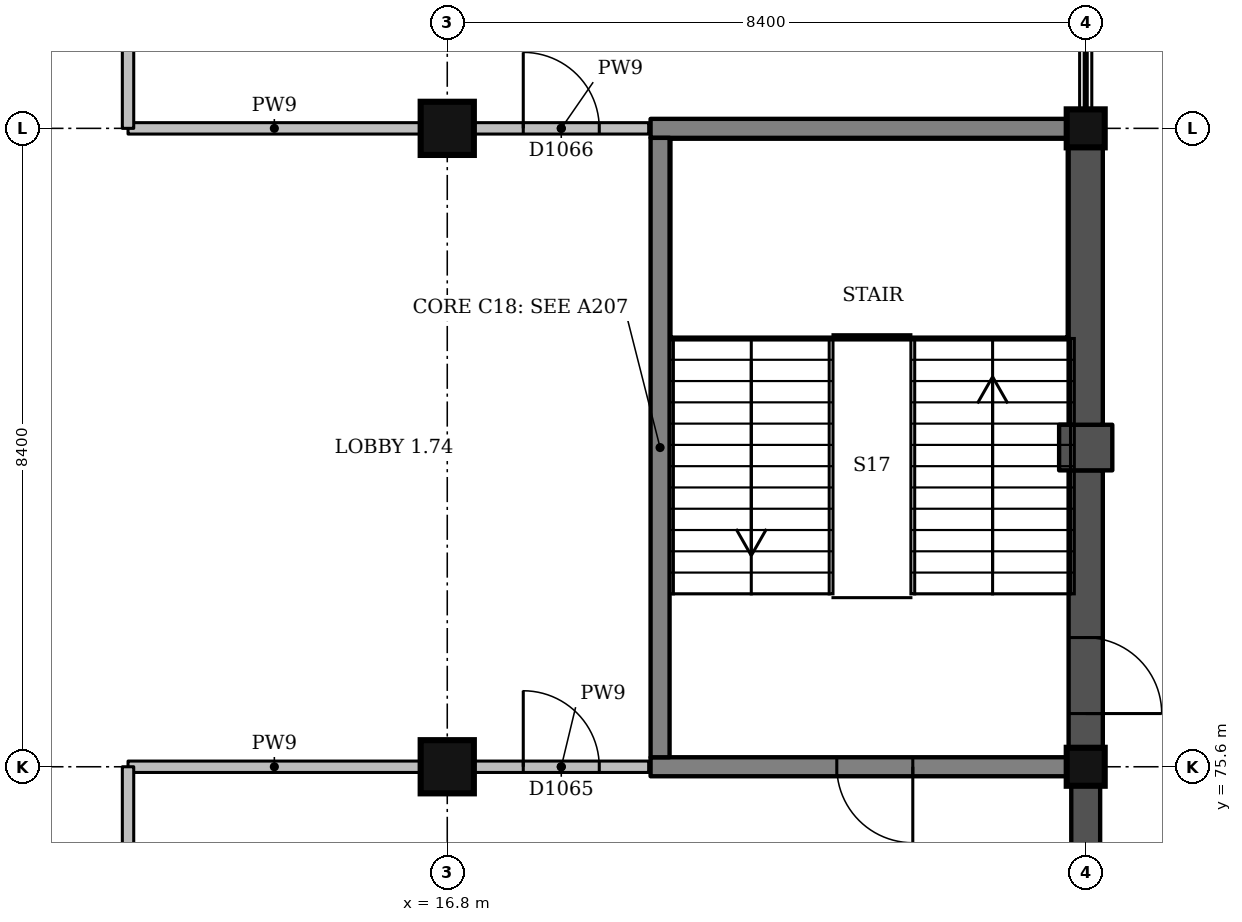
"""IFC4 building model, lengths in metres.
Left out: names, types, materials, properties, quantities, classifications, styles, units other than length and angle.
Written with IfcOpenShell. Run it as: python <this file> out.ifc"""

import sys

from ifc_helpers import new_model, si_unit, direction, frame, frame_2d, origin, origin_2d, place, context, subcontext, project, spatial, rectangle, extrude, element, fill, save


model = new_model("IFC4")
c1 = context("Model", 3, precision=1e-05, world=origin(), true_north=direction((0.0, 1.0)))
c2 = subcontext(c1, "Body", "Model", "MODEL_VIEW")
j1 = project(units=[si_unit("LENGTHUNIT", "METRE"), si_unit("PLANEANGLEUNIT", "RADIAN")], contexts=[c1])
p1 = place(None, origin())
s1 = spatial("IfcSite", under=j1, at=p1, CompositionType="ELEMENT")
p2 = place(p1, origin())
s2 = spatial("IfcBuilding", under=s1, at=p2, CompositionType="ELEMENT")
p3 = place(p2, frame((0.0, 0.0, 4.5)))
s3 = spatial("IfcBuildingStorey", under=s2, at=p3, CompositionType="ELEMENT", Elevation=4.5)
for number, where, z_axis, x_axis in (
    (1, (16.8, 75.6, -1.5), (0.0, 0.0, 1.0), (1.0, 0.0, 0.0)),
    (2, (16.8, 84.0, -1.5), (0.0, 0.0, 1.0), (1.0, 0.0, 0.0)),
):
    element("IfcColumn", number, at=place(p3, frame(where, z_axis=z_axis, x_axis=x_axis)), inside=s3, PredefinedType="COLUMN", context=c2, shape_type="SweptSolid", body=[
        extrude(rectangle(XDim=0.7, YDim=0.7, at=origin_2d()), origin(), (0.0, 0.0, 1.0), 6.0),
    ])
for number, where, z_axis, x_axis in (
    (3, (25.2, 75.6, -1.5), (0.0, 0.0, 1.0), (1.0, 0.0, 0.0)),
    (4, (25.2, 84.0, -1.5), (0.0, 0.0, 1.0), (1.0, 0.0, 0.0)),
):
    element("IfcColumn", number, at=place(p3, frame(where, z_axis=z_axis, x_axis=x_axis)), inside=s3, PredefinedType="COLUMN", context=c2, shape_type="SweptSolid", body=[
        extrude(rectangle(XDim=0.5, YDim=0.5, at=origin_2d()), origin(), (0.0, 0.0, 1.0), 6.0),
    ])
p4 = place(p3, frame((19.475, 75.6, 0.0), z_axis=(0.0, 0.0, 1.0), x_axis=(1.0, 0.0, 0.0)))
e5 = element("IfcWall", 5, at=p4, inside=s3, PredefinedType="SHEAR", context=c2, shape_type="SweptSolid", body=[
    extrude(rectangle(XDim=5.475, YDim=0.25, at=frame_2d((2.737, 0.0))), origin(), (0.0, 0.0, 1.0), 4.5),
])
p5 = place(p4, frame((2.45, 0.0, 0.0)))
e6 = element("IfcOpeningElement", 6, at=p5, cuts=e5, PredefinedType="OPENING", context=c2, shape_type="SweptSolid", body=[
    extrude(rectangle(XDim=1.0, YDim=2.1, at=frame_2d((0.5, 1.05))), frame((0.0, 0.135, 0.0), z_axis=(0.0, -1.0, 0.0), x_axis=(1.0, 0.0, 0.0)), (0.0, 0.0, 1.0), 0.27),
])
p6 = place(p3, frame((19.475, 84.0, 0.0), z_axis=(0.0, 0.0, 1.0), x_axis=(1.0, 0.0, 0.0)))
e7 = element("IfcWall", 7, at=p6, inside=s3, PredefinedType="SHEAR", context=c2, shape_type="SweptSolid", body=[
    extrude(rectangle(XDim=5.475, YDim=0.25, at=frame_2d((2.737, 0.0))), origin(), (0.0, 0.0, 1.0), 4.5),
])
p7 = place(p3, frame((19.6, 75.725, 0.0), z_axis=(0.0, 0.0, 1.0), x_axis=(0.0, 1.0, 0.0)))
e8 = element("IfcWall", 8, at=p7, inside=s3, PredefinedType="SHEAR", context=c2, shape_type="SweptSolid", body=[
    extrude(rectangle(XDim=8.15, YDim=0.25, at=frame_2d((4.075, 0.0))), origin(), (0.0, 0.0, 1.0), 4.5),
])
p8 = place(p3, frame((25.2, 71.7, 0.0), z_axis=(0.0, 0.0, 1.0), x_axis=(0.0, 1.0, 0.0)))
e9 = element("IfcWall", 9, at=p8, inside=s3, PredefinedType="SOLIDWALL", context=c2, shape_type="SweptSolid", body=[
    extrude(rectangle(XDim=3.65, YDim=0.38, at=frame_2d((1.825, 0.0))), origin(), (0.0, 0.0, 1.0), 3.35),
])
p9 = place(p8, frame((1.325, 0.0, 0.0)))
e10 = element("IfcOpeningElement", 10, at=p9, cuts=e9, PredefinedType="OPENING", context=c2, shape_type="SweptSolid", body=[
    extrude(rectangle(XDim=1.0, YDim=2.1, at=frame_2d((0.5, 1.05))), frame((0.0, 0.2, 0.0), z_axis=(0.0, -1.0, 0.0), x_axis=(1.0, 0.0, 0.0)), (0.0, 0.0, 1.0), 0.4),
])
p10 = place(p3, frame((25.2, 75.85, 0.0), z_axis=(0.0, 0.0, 1.0), x_axis=(0.0, 1.0, 0.0)))
e11 = element("IfcWall", 11, at=p10, inside=s3, PredefinedType="SOLIDWALL", context=c2, shape_type="SweptSolid", body=[
    extrude(rectangle(XDim=3.65, YDim=0.45, at=frame_2d((1.825, 0.0))), origin(), (0.0, 0.0, 1.0), 3.65),
])
p11 = place(p10, frame((1.45, 0.0, 0.0), z_axis=(0.0, 0.0, 1.0), x_axis=(-1.0, 0.0, 0.0)))
e12 = element("IfcOpeningElement", 12, at=p11, cuts=e11, PredefinedType="OPENING", context=c2, shape_type="SweptSolid", body=[
    extrude(rectangle(XDim=1.0, YDim=2.1, at=frame_2d((0.5, 1.05))), frame((0.0, 0.235, 0.0), z_axis=(0.0, -1.0, 0.0), x_axis=(1.0, 0.0, 0.0)), (0.0, 0.0, 1.0), 0.47),
])
p12 = place(p3, frame((25.2, 79.5, 0.0), z_axis=(0.0, 0.0, 1.0), x_axis=(0.0, 1.0, 0.0)))
e13 = element("IfcWall", 13, at=p12, inside=s3, PredefinedType="SOLIDWALL", context=c2, shape_type="SweptSolid", body=[
    extrude(rectangle(XDim=0.6, YDim=0.7, at=frame_2d((0.3, 0.0))), origin(), (0.0, 0.0, 1.0), 3.65),
])
p13 = place(p3, frame((25.2, 80.1, 0.0), z_axis=(0.0, 0.0, 1.0), x_axis=(0.0, 1.0, 0.0)))
e14 = element("IfcWall", 14, at=p13, inside=s3, PredefinedType="SOLIDWALL", context=c2, shape_type="SweptSolid", body=[
    extrude(rectangle(XDim=3.65, YDim=0.45, at=frame_2d((1.825, 0.0))), origin(), (0.0, 0.0, 1.0), 3.65),
])
p14 = place(p3, frame((12.6, 75.6, 0.0), z_axis=(0.0, 0.0, 1.0), x_axis=(1.0, 0.0, 0.0)))
e15 = element("IfcWall", 15, at=p14, inside=s3, PredefinedType="PARTITIONING", context=c2, shape_type="SweptSolid", body=[
    extrude(rectangle(XDim=3.85, YDim=0.15, at=frame_2d((1.925, 0.0))), origin(), (0.0, 0.0, 1.0), 3.4),
])
p15 = place(p3, frame((17.15, 75.6, 0.0), z_axis=(0.0, 0.0, 1.0), x_axis=(1.0, 0.0, 0.0)))
e16 = element("IfcWall", 16, at=p15, inside=s3, PredefinedType="PARTITIONING", context=c2, shape_type="SweptSolid", body=[
    extrude(rectangle(XDim=2.3, YDim=0.15, at=frame_2d((1.15, 0.0))), origin(), (0.0, 0.0, 1.0), 3.5),
])
p16 = place(p15, frame((0.65, 0.0, 0.0)))
e17 = element("IfcOpeningElement", 17, at=p16, cuts=e16, PredefinedType="OPENING", context=c2, shape_type="SweptSolid", body=[
    extrude(rectangle(XDim=1.0, YDim=2.1, at=frame_2d((0.5, 1.05))), frame((0.0, 0.085, 0.0), z_axis=(0.0, -1.0, 0.0), x_axis=(1.0, 0.0, 0.0)), (0.0, 0.0, 1.0), 0.17),
])
p17 = place(p3, frame((12.6, 84.0, 0.0), z_axis=(0.0, 0.0, 1.0), x_axis=(1.0, 0.0, 0.0)))
e18 = element("IfcWall", 18, at=p17, inside=s3, PredefinedType="PARTITIONING", context=c2, shape_type="SweptSolid", body=[
    extrude(rectangle(XDim=3.85, YDim=0.15, at=frame_2d((1.925, 0.0))), origin(), (0.0, 0.0, 1.0), 3.4),
])
p18 = place(p3, frame((17.15, 84.0, 0.0), z_axis=(0.0, 0.0, 1.0), x_axis=(1.0, 0.0, 0.0)))
e19 = element("IfcWall", 19, at=p18, inside=s3, PredefinedType="PARTITIONING", context=c2, shape_type="SweptSolid", body=[
    extrude(rectangle(XDim=2.3, YDim=0.15, at=frame_2d((1.15, 0.0))), origin(), (0.0, 0.0, 1.0), 3.5),
])
p19 = place(p18, frame((0.65, 0.0, 0.0)))
e20 = element("IfcOpeningElement", 20, at=p19, cuts=e19, PredefinedType="OPENING", context=c2, shape_type="SweptSolid", body=[
    extrude(rectangle(XDim=1.0, YDim=2.1, at=frame_2d((0.5, 1.05))), frame((0.0, 0.085, 0.0), z_axis=(0.0, -1.0, 0.0), x_axis=(1.0, 0.0, 0.0)), (0.0, 0.0, 1.0), 0.17),
])
p20 = place(p3, frame((12.6, 50.4, 0.0), z_axis=(0.0, 0.0, 1.0), x_axis=(0.0, 1.0, 0.0)))
e21 = element("IfcWall", 21, at=p20, inside=s3, PredefinedType="PARTITIONING", context=c2, shape_type="SweptSolid", body=[
    extrude(rectangle(XDim=25.2, YDim=0.15, at=frame_2d((12.6, 0.0))), origin(), (0.0, 0.0, 1.0), 3.4),
])
p21 = place(p20, frame((3.8, 0.0, 0.0)))
e22 = element("IfcOpeningElement", 22, at=p21, cuts=e21, PredefinedType="OPENING", context=c2, shape_type="SweptSolid", body=[
    extrude(rectangle(XDim=1.0, YDim=2.1, at=frame_2d((0.5, 1.05))), frame((0.0, 0.085, 0.0), z_axis=(0.0, -1.0, 0.0), x_axis=(1.0, 0.0, 0.0)), (0.0, 0.0, 1.0), 0.17),
])
p22 = place(p20, frame((12.2, 0.0, 0.0)))
e23 = element("IfcOpeningElement", 23, at=p22, cuts=e21, PredefinedType="OPENING", context=c2, shape_type="SweptSolid", body=[
    extrude(rectangle(XDim=1.0, YDim=2.1, at=frame_2d((0.5, 1.05))), frame((0.0, 0.085, 0.0), z_axis=(0.0, -1.0, 0.0), x_axis=(1.0, 0.0, 0.0)), (0.0, 0.0, 1.0), 0.17),
])
p23 = place(p3, frame((12.6, 84.0, 0.0), z_axis=(0.0, 0.0, 1.0), x_axis=(0.0, 1.0, 0.0)))
e24 = element("IfcWall", 24, at=p23, inside=s3, PredefinedType="PARTITIONING", context=c2, shape_type="SweptSolid", body=[
    extrude(rectangle(XDim=8.4, YDim=0.15, at=frame_2d((4.2, 0.0))), origin(), (0.0, 0.0, 1.0), 3.4),
])
p24 = place(p16, origin())
e25 = element("IfcDoor", 25, at=p24, inside=s3, OperationType="SINGLE_SWING_LEFT", PredefinedType="DOOR", context=c2, shape_type="SweptSolid", body=[
    extrude(rectangle(XDim=1.0, YDim=2.1, at=frame_2d((0.5, 1.05))), frame((0.0, 0.025, 0.0), z_axis=(0.0, -1.0, 0.0), x_axis=(1.0, 0.0, 0.0)), (0.0, 0.0, 1.0), 0.05),
])
fill(e17, e25)
p25 = place(p19, origin())
e26 = element("IfcDoor", 26, at=p25, inside=s3, OperationType="SINGLE_SWING_LEFT", PredefinedType="DOOR", context=c2, shape_type="SweptSolid", body=[
    extrude(rectangle(XDim=1.0, YDim=2.1, at=frame_2d((0.5, 1.05))), frame((0.0, 0.025, 0.0), z_axis=(0.0, -1.0, 0.0), x_axis=(1.0, 0.0, 0.0)), (0.0, 0.0, 1.0), 0.05),
])
fill(e20, e26)
p26 = place(p5, origin())
e27 = element("IfcDoor", 27, at=p26, inside=s3, OperationType="SINGLE_SWING_RIGHT", PredefinedType="DOOR", context=c2, shape_type="SweptSolid", body=[
    extrude(rectangle(XDim=1.0, YDim=2.1, at=frame_2d((0.5, 1.05))), frame((0.0, 0.025, 0.0), z_axis=(0.0, -1.0, 0.0), x_axis=(1.0, 0.0, 0.0)), (0.0, 0.0, 1.0), 0.05),
])
fill(e6, e27)
p27 = place(p11, origin())
e28 = element("IfcDoor", 28, at=p27, inside=s3, OperationType="SINGLE_SWING_LEFT", PredefinedType="DOOR", context=c2, shape_type="SweptSolid", body=[
    extrude(rectangle(XDim=1.0, YDim=2.1, at=frame_2d((0.5, 1.05))), frame((0.0, 0.025, 0.0), z_axis=(0.0, -1.0, 0.0), x_axis=(1.0, 0.0, 0.0)), (0.0, 0.0, 1.0), 0.05),
])
fill(e12, e28)
save(model, sys.argv[1])
